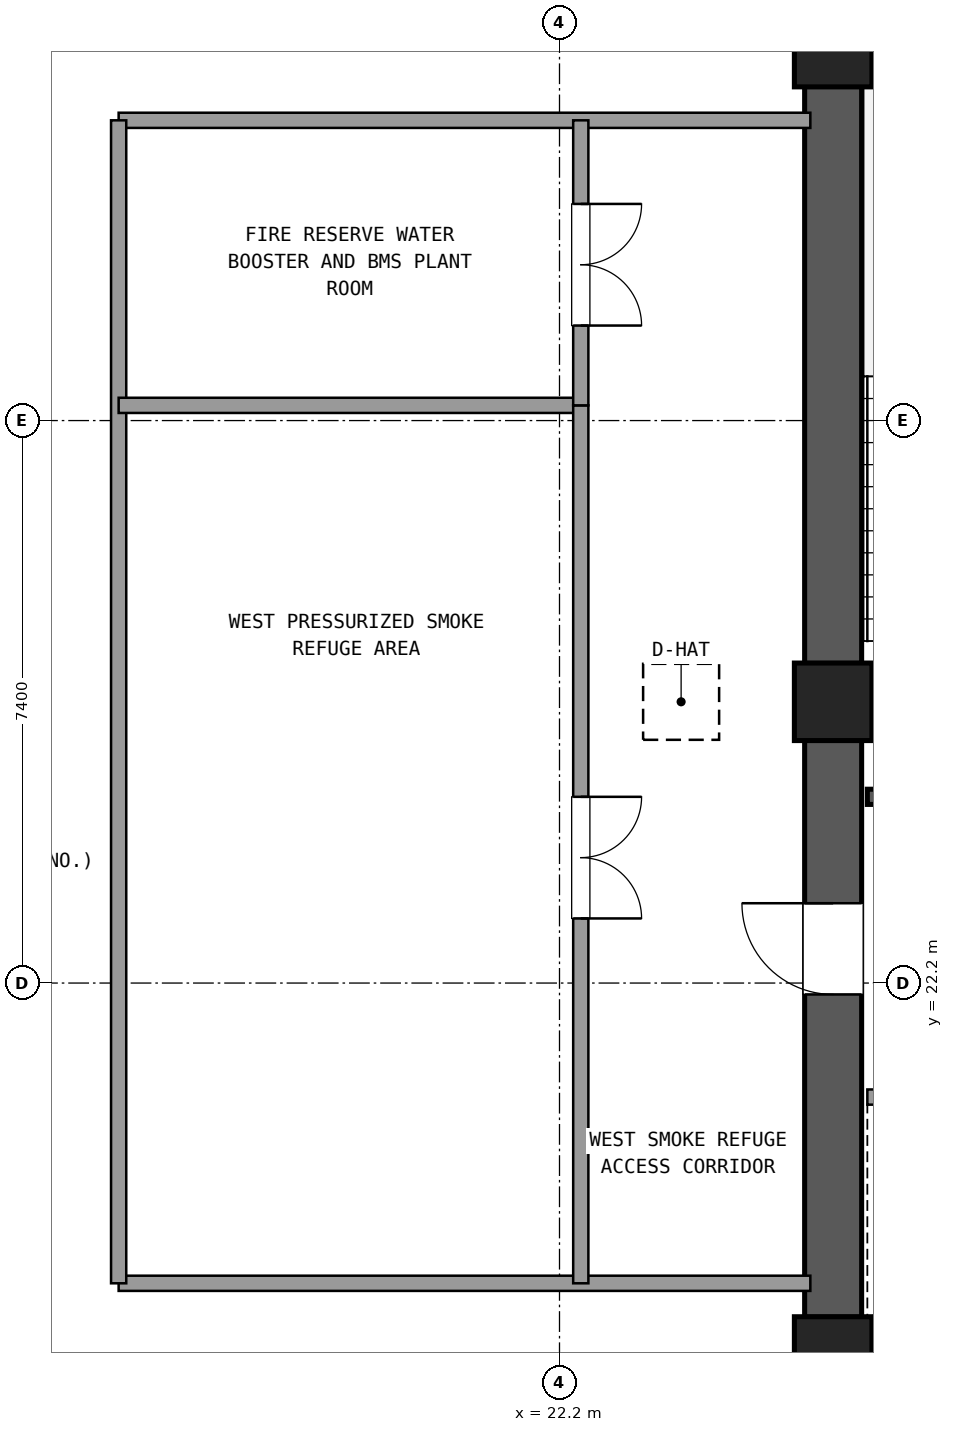
"""IFC4 building model, lengths in metres.
Left out: names, types, materials, properties, quantities, classifications, styles, units other than length and angle.
Written with IfcOpenShell. Run it as: python <this file> out.ifc"""

import sys

from ifc_helpers import new_model, si_unit, direction, frame, frame_2d, origin, origin_2d, place, context, subcontext, project, spatial, rectangle, extrude, element, fill, save


model = new_model("IFC4")
c1 = context("Model", 3, precision=1e-05, world=origin(), true_north=direction((0.0, 1.0)))
c2 = subcontext(c1, "Body", "Model", "MODEL_VIEW")
j1 = project(units=[si_unit("LENGTHUNIT", "METRE"), si_unit("PLANEANGLEUNIT", "RADIAN")], contexts=[c1])
p1 = place(None, origin())
s1 = spatial("IfcSite", under=j1, at=p1, CompositionType="ELEMENT")
p2 = place(p1, origin())
s2 = spatial("IfcBuilding", under=s1, at=p2, CompositionType="ELEMENT")
p3 = place(p2, frame((0.0, 0.0, 124.38)))
s3 = spatial("IfcBuildingStorey", under=s2, at=p3, CompositionType="ELEMENT", Elevation=124.38)
for number, where, z_axis, x_axis in (
    (1, (25.8, 17.3, 0.0), (0.0, 0.0, 1.0), (1.0, 0.0, 0.0)),
    (2, (25.8, 34.5, 0.0), (0.0, 0.0, 1.0), (1.0, 0.0, 0.0)),
    (3, (25.8, 25.9, 0.0), (0.0, 0.0, 1.0), (1.0, 0.0, 0.0)),
):
    element("IfcColumn", number, at=place(p3, frame(where, z_axis=z_axis, x_axis=x_axis)), inside=s3, PredefinedType="COLUMN", context=c2, shape_type="SweptSolid", body=[
        extrude(rectangle(XDim=1.02, YDim=1.02, at=origin_2d()), origin(), (0.0, 0.0, 1.0), 4.68),
    ])
p4 = place(p3, frame((26.305, 17.3, 0.0), z_axis=(0.0, 0.0, 1.0), x_axis=(1.0, 0.0, 0.0)))
e4 = element("IfcWall", 4, at=p4, inside=s3, PredefinedType="SHEAR", context=c2, shape_type="SweptSolid", body=[
    extrude(rectangle(XDim=10.19, YDim=0.75, at=frame_2d((5.095, 0.0))), origin(), (0.0, 0.0, 1.0), 4.38),
])
p5 = place(p3, frame((36.495, 34.5, 0.0), z_axis=(0.0, 0.0, 1.0), x_axis=(-1.0, 0.0, 0.0)))
e5 = element("IfcWall", 5, at=p5, inside=s3, PredefinedType="SHEAR", context=c2, shape_type="SweptSolid", body=[
    extrude(rectangle(XDim=10.19, YDim=0.75, at=frame_2d((5.095, 0.0))), origin(), (0.0, 0.0, 1.0), 4.38),
])
p6 = place(p5, frame((4.095, 0.0, 0.0)))
e6 = element("IfcOpeningElement", 6, at=p6, cuts=e5, PredefinedType="OPENING", context=c2, shape_type="SweptSolid", body=[
    extrude(rectangle(XDim=1.2, YDim=2.15, at=frame_2d((0.6, 1.075))), frame((0.0, 0.385, 0.0), z_axis=(0.0, -1.0, 0.0), x_axis=(1.0, 0.0, 0.0)), (0.0, 0.0, 1.0), 0.77),
])
p7 = place(p3, frame((25.8, 33.995, 0.0), z_axis=(0.0, 0.0, 1.0), x_axis=(0.0, -1.0, 0.0)))
e7 = element("IfcWall", 7, at=p7, inside=s3, PredefinedType="SHEAR", context=c2, shape_type="SweptSolid", body=[
    extrude(rectangle(XDim=7.59, YDim=0.75, at=frame_2d((3.795, 0.0))), origin(), (0.0, 0.0, 1.0), 4.38),
])
p8 = place(p3, frame((25.8, 25.395, 0.0), z_axis=(0.0, 0.0, 1.0), x_axis=(0.0, -1.0, 0.0)))
e8 = element("IfcWall", 8, at=p8, inside=s3, PredefinedType="SHEAR", context=c2, shape_type="SweptSolid", body=[
    extrude(rectangle(XDim=7.59, YDim=0.75, at=frame_2d((3.795, 0.0))), origin(), (0.0, 0.0, 1.0), 4.38),
])
p9 = place(p8, frame((2.145, 0.0, 0.0)))
e9 = element("IfcOpeningElement", 9, at=p9, cuts=e8, PredefinedType="OPENING", context=c2, shape_type="SweptSolid", body=[
    extrude(rectangle(XDim=1.2, YDim=2.15, at=frame_2d((0.6, 1.075))), frame((0.0, 0.385, 0.0), z_axis=(0.0, -1.0, 0.0), x_axis=(1.0, 0.0, 0.0)), (0.0, 0.0, 1.0), 0.77),
])
p10 = place(p3, frame((26.25, 24.65, 0.0), z_axis=(0.0, 0.0, 1.0), x_axis=(1.0, 0.0, 0.0)))
e10 = element("IfcWall", 10, at=p10, inside=s3, PredefinedType="SHEAR", context=c2, shape_type="SweptSolid", body=[
    extrude(rectangle(XDim=4.0, YDim=0.2, at=frame_2d((2.0, 0.0))), origin(), (0.0, 0.0, 1.0), 4.38),
])
p11 = place(p10, frame((1.0, 0.0, 0.0)))
e11 = element("IfcOpeningElement", 11, at=p11, cuts=e10, PredefinedType="OPENING", context=c2, shape_type="SweptSolid", body=[
    extrude(rectangle(XDim=1.2, YDim=2.15, at=frame_2d((0.6, 1.075))), frame((0.0, 0.11, 0.0), z_axis=(0.0, -1.0, 0.0), x_axis=(1.0, 0.0, 0.0)), (0.0, 0.0, 1.0), 0.22),
])
p12 = place(p3, frame((26.25, 20.7, 0.0), z_axis=(0.0, 0.0, 1.0), x_axis=(1.0, 0.0, 0.0)))
e12 = element("IfcWall", 12, at=p12, inside=s3, PredefinedType="SOLIDWALL", context=c2, shape_type="SweptSolid", body=[
    extrude(rectangle(XDim=4.0, YDim=0.2, at=frame_2d((2.0, 0.0))), origin(), (0.0, 0.0, 1.0), 3.49),
])
p13 = place(p12, frame((0.65, 0.0, 0.0)))
e13 = element("IfcOpeningElement", 13, at=p13, cuts=e12, PredefinedType="OPENING", context=c2, shape_type="SweptSolid", body=[
    extrude(rectangle(XDim=1.2, YDim=2.15, at=frame_2d((0.6, 1.075))), frame((0.0, 0.11, 0.0), z_axis=(0.0, -1.0, 0.0), x_axis=(1.0, 0.0, 0.0)), (0.0, 0.0, 1.0), 0.22),
])
for number, where, z_axis, x_axis in (
    (14, (16.4, 18.25, 0.0), (0.0, 0.0, 1.0), (1.0, 0.0, 0.0)),
    (15, (16.4, 33.55, 0.0), (0.0, 0.0, 1.0), (1.0, 0.0, 0.0)),
):
    element("IfcWall", number, at=place(p3, frame(where, z_axis=z_axis, x_axis=x_axis)), inside=s3, PredefinedType="SOLIDWALL", context=c2, shape_type="SweptSolid", body=[
        extrude(rectangle(XDim=9.1, YDim=0.2, at=frame_2d((4.55, 0.0))), origin(), (0.0, 0.0, 1.0), 3.49),
    ])
p14 = place(p3, frame((16.4, 18.25, 0.0), z_axis=(0.0, 0.0, 1.0), x_axis=(0.0, 1.0, 0.0)))
e16 = element("IfcWall", 16, at=p14, inside=s3, PredefinedType="SOLIDWALL", context=c2, shape_type="SweptSolid", body=[
    extrude(rectangle(XDim=15.3, YDim=0.2, at=frame_2d((7.65, 0.0))), origin(), (0.0, 0.0, 1.0), 3.49),
])
p15 = place(p3, frame((16.4, 29.8, 0.0), z_axis=(0.0, 0.0, 1.0), x_axis=(1.0, 0.0, 0.0)))
e17 = element("IfcWall", 17, at=p15, inside=s3, PredefinedType="SOLIDWALL", context=c2, shape_type="SweptSolid", body=[
    extrude(rectangle(XDim=6.08, YDim=0.2, at=frame_2d((3.04, 0.0))), origin(), (0.0, 0.0, 1.0), 3.49),
])
p16 = place(p3, frame((22.48, 18.25, 0.0), z_axis=(0.0, 0.0, 1.0), x_axis=(0.0, 1.0, 0.0)))
e18 = element("IfcWall", 18, at=p16, inside=s3, PredefinedType="SOLIDWALL", context=c2, shape_type="SweptSolid", body=[
    extrude(rectangle(XDim=11.55, YDim=0.2, at=frame_2d((5.775, 0.0))), origin(), (0.0, 0.0, 1.0), 3.49),
])
p17 = place(p16, frame((4.8, 0.0, 0.0)))
e19 = element("IfcOpeningElement", 19, at=p17, cuts=e18, PredefinedType="OPENING", context=c2, shape_type="SweptSolid", body=[
    extrude(rectangle(XDim=1.6, YDim=2.2, at=frame_2d((0.8, 1.1))), frame((0.0, 0.11, 0.0), z_axis=(0.0, -1.0, 0.0), x_axis=(1.0, 0.0, 0.0)), (0.0, 0.0, 1.0), 0.22),
])
p18 = place(p3, frame((22.48, 29.8, 0.0), z_axis=(0.0, 0.0, 1.0), x_axis=(0.0, 1.0, 0.0)))
e20 = element("IfcWall", 20, at=p18, inside=s3, PredefinedType="SOLIDWALL", context=c2, shape_type="SweptSolid", body=[
    extrude(rectangle(XDim=3.75, YDim=0.2, at=frame_2d((1.875, 0.0))), origin(), (0.0, 0.0, 1.0), 3.49),
])
p19 = place(p18, frame((1.05, 0.0, 0.0)))
e21 = element("IfcOpeningElement", 21, at=p19, cuts=e20, PredefinedType="OPENING", context=c2, shape_type="SweptSolid", body=[
    extrude(rectangle(XDim=1.6, YDim=2.2, at=frame_2d((0.8, 1.1))), frame((0.0, 0.11, 0.0), z_axis=(0.0, -1.0, 0.0), x_axis=(1.0, 0.0, 0.0)), (0.0, 0.0, 1.0), 0.22),
])
p20 = place(p3, frame((0.0, 0.0, -0.3)))
p21 = place(p20, frame((23.8, 25.9, -0.01)))
p22 = place(p21, frame((0.0, 0.0, 0.29)))
e22 = element("IfcDoor", 22, at=p22, inside=s3, OperationType="SINGLE_SWING_LEFT", PredefinedType="TRAPDOOR", context=c2, shape_type="SweptSolid", body=[
    extrude(rectangle(XDim=1.0, YDim=1.0, at=origin_2d()), origin(), (0.0, 0.0, 1.0), 0.02),
])
p23 = place(p9, frame((1.2, 0.0, 0.0), z_axis=(0.0, 0.0, 1.0), x_axis=(-1.0, 0.0, 0.0)))
e23 = element("IfcDoor", 23, at=p23, inside=s3, OperationType="SINGLE_SWING_LEFT", PredefinedType="DOOR", context=c2, shape_type="SweptSolid", body=[
    extrude(rectangle(XDim=1.2, YDim=2.15, at=frame_2d((0.6, 1.075))), frame((0.0, 0.025, 0.0), z_axis=(0.0, -1.0, 0.0), x_axis=(1.0, 0.0, 0.0)), (0.0, 0.0, 1.0), 0.05),
])
fill(e9, e23)
p24 = place(p17, frame((1.6, 0.0, 0.0), z_axis=(0.0, 0.0, 1.0), x_axis=(-1.0, 0.0, 0.0)))
e24 = element("IfcDoor", 24, at=p24, inside=s3, OperationType="DOUBLE_DOOR_SINGLE_SWING", PredefinedType="DOOR", context=c2, shape_type="SweptSolid", body=[
    extrude(rectangle(XDim=1.6, YDim=2.2, at=frame_2d((0.8, 1.1))), frame((0.0, 0.025, 0.0), z_axis=(0.0, -1.0, 0.0), x_axis=(1.0, 0.0, 0.0)), (0.0, 0.0, 1.0), 0.05),
])
fill(e19, e24)
p25 = place(p19, frame((1.6, 0.0, 0.0), z_axis=(0.0, 0.0, 1.0), x_axis=(-1.0, 0.0, 0.0)))
e25 = element("IfcDoor", 25, at=p25, inside=s3, OperationType="DOUBLE_DOOR_SINGLE_SWING", PredefinedType="DOOR", context=c2, shape_type="SweptSolid", body=[
    extrude(rectangle(XDim=1.6, YDim=2.2, at=frame_2d((0.8, 1.1))), frame((0.0, 0.025, 0.0), z_axis=(0.0, -1.0, 0.0), x_axis=(1.0, 0.0, 0.0)), (0.0, 0.0, 1.0), 0.05),
])
fill(e21, e25)
save(model, sys.argv[1])
